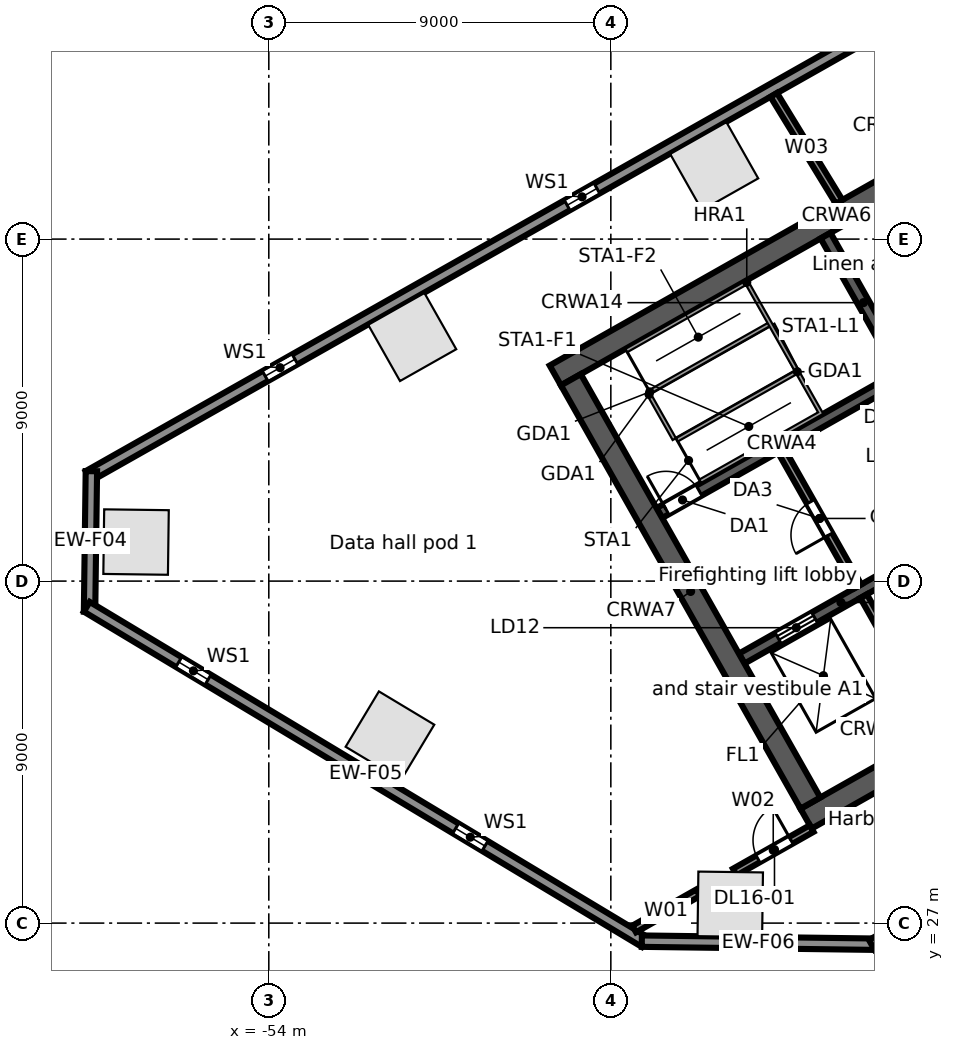
"""IFC4 building model, lengths in metres.
Left out: names, types, materials, properties, quantities, classifications, styles, units other than length and angle.
Written with IfcOpenShell. Run it as: python <this file> out.ifc"""

import sys

from ifc_helpers import new_model, si_unit, direction, frame, frame_2d, origin, origin_2d, place, context, subcontext, project, spatial, rectangle, extrude, element, fill, save


model = new_model("IFC4")
c1 = context("Model", 3, precision=1e-05, world=origin(), true_north=direction((0.0, 1.0)))
c2 = subcontext(c1, "Body", "Model", "MODEL_VIEW")
j1 = project(units=[si_unit("LENGTHUNIT", "METRE"), si_unit("PLANEANGLEUNIT", "RADIAN")], contexts=[c1])
p1 = place(None, origin())
s1 = spatial("IfcSite", under=j1, at=p1, CompositionType="ELEMENT")
p2 = place(p1, origin())
s2 = spatial("IfcBuilding", under=s1, at=p2, CompositionType="ELEMENT")
p3 = place(p2, frame((0.0, 0.0, 81.5)))
s3 = spatial("IfcBuildingStorey", under=s2, at=p3, CompositionType="ELEMENT", Elevation=81.5)
for number, where, z_axis, x_axis in (
    (1, (-42.28, 46.919, 0.0), (0.0, 0.0, 1.0), (-0.87, -0.492, 0.0)),
    (2, (-50.226, 42.423, 0.0), (0.0, 0.0, 1.0), (-0.87, -0.492, 0.0)),
    (3, (-57.493, 37.027, 0.0), (0.0, 0.0, 1.0), (-0.013, -1.0, 0.0)),
    (4, (-50.812, 31.931, 0.0), (0.0, 0.0, 1.0), (0.857, -0.515, 0.0)),
    (5, (-41.858, 27.495, 0.0), (0.0, 0.0, 1.0), (1.0, -0.013, 0.0)),
):
    element("IfcColumn", number, at=place(p3, frame(where, z_axis=z_axis, x_axis=x_axis)), inside=s3, PredefinedType="COLUMN", context=c2, shape_type="SweptSolid", body=[
        extrude(rectangle(XDim=1.7, YDim=1.7, at=origin_2d()), origin(), (0.0, 0.0, 1.0), 5.0),
    ])
p4 = place(p3, frame((-58.745, 38.764, 0.0), z_axis=(0.0, 0.0, 1.0), x_axis=(0.870355811726, 0.492423355453, 0.0)))
e6 = element("IfcWall", 6, at=p4, inside=s3, PredefinedType="STANDARD", context=c2, shape_type="SweptSolid", body=[
    extrude(rectangle(XDim=64.025, YDim=0.3, at=frame_2d((32.013, 0.0))), origin(), (0.0, 0.0, 1.0), 4.68),
])
p5 = place(p4, frame((60.122, 0.0, 0.6)))
e7 = element("IfcOpeningElement", 7, at=p5, cuts=e6, PredefinedType="OPENING", context=c2, shape_type="SweptSolid", body=[
    extrude(rectangle(XDim=0.9, YDim=3.2, at=frame_2d((0.45, 1.6))), frame((0.0, 0.16, 0.0), z_axis=(0.0, -1.0, 0.0), x_axis=(1.0, 0.0, 0.0)), (0.0, 0.0, 1.0), 0.32),
])
p6 = place(p4, frame((50.992, 0.0, 0.6)))
e8 = element("IfcOpeningElement", 8, at=p6, cuts=e6, PredefinedType="OPENING", context=c2, shape_type="SweptSolid", body=[
    extrude(rectangle(XDim=0.9, YDim=3.2, at=frame_2d((0.45, 1.6))), frame((0.0, 0.16, 0.0), z_axis=(0.0, -1.0, 0.0), x_axis=(1.0, 0.0, 0.0)), (0.0, 0.0, 1.0), 0.32),
])
p7 = place(p4, frame((41.862, 0.0, 0.6)))
e9 = element("IfcOpeningElement", 9, at=p7, cuts=e6, PredefinedType="OPENING", context=c2, shape_type="SweptSolid", body=[
    extrude(rectangle(XDim=0.9, YDim=3.2, at=frame_2d((0.45, 1.6))), frame((0.0, 0.16, 0.0), z_axis=(0.0, -1.0, 0.0), x_axis=(1.0, 0.0, 0.0)), (0.0, 0.0, 1.0), 0.32),
])
p8 = place(p4, frame((32.732, 0.0, 0.6)))
e10 = element("IfcOpeningElement", 10, at=p8, cuts=e6, PredefinedType="OPENING", context=c2, shape_type="SweptSolid", body=[
    extrude(rectangle(XDim=0.9, YDim=3.2, at=frame_2d((0.45, 1.6))), frame((0.0, 0.16, 0.0), z_axis=(0.0, -1.0, 0.0), x_axis=(1.0, 0.0, 0.0)), (0.0, 0.0, 1.0), 0.32),
])
p9 = place(p4, frame((23.602, 0.0, 0.6)))
e11 = element("IfcOpeningElement", 11, at=p9, cuts=e6, PredefinedType="OPENING", context=c2, shape_type="SweptSolid", body=[
    extrude(rectangle(XDim=0.9, YDim=3.2, at=frame_2d((0.45, 1.6))), frame((0.0, 0.16, 0.0), z_axis=(0.0, -1.0, 0.0), x_axis=(1.0, 0.0, 0.0)), (0.0, 0.0, 1.0), 0.32),
])
p10 = place(p4, frame((14.472, 0.0, 0.6)))
e12 = element("IfcOpeningElement", 12, at=p10, cuts=e6, PredefinedType="OPENING", context=c2, shape_type="SweptSolid", body=[
    extrude(rectangle(XDim=0.9, YDim=3.2, at=frame_2d((0.45, 1.6))), frame((0.0, 0.16, 0.0), z_axis=(0.0, -1.0, 0.0), x_axis=(1.0, 0.0, 0.0)), (0.0, 0.0, 1.0), 0.32),
])
p11 = place(p4, frame((5.342, 0.0, 0.6)))
e13 = element("IfcOpeningElement", 13, at=p11, cuts=e6, PredefinedType="OPENING", context=c2, shape_type="SweptSolid", body=[
    extrude(rectangle(XDim=0.9, YDim=3.2, at=frame_2d((0.45, 1.6))), frame((0.0, 0.16, 0.0), z_axis=(0.0, -1.0, 0.0), x_axis=(1.0, 0.0, 0.0)), (0.0, 0.0, 1.0), 0.32),
])
p12 = place(p3, frame((-58.717, 35.194, 0.0), z_axis=(0.0, 0.0, 1.0), x_axis=(0.013069053407, 0.999914596275, 0.0)))
e14 = element("IfcWall", 14, at=p12, inside=s3, PredefinedType="STANDARD", context=c2, shape_type="SweptSolid", body=[
    extrude(rectangle(XDim=3.699, YDim=0.3, at=frame_2d((1.849, 0.0))), origin(), (0.0, 0.0, 1.0), 4.68),
])
p13 = place(p3, frame((-44.109, 26.504, 0.0), z_axis=(0.0, 0.0, 1.0), x_axis=(-0.857169502585, 0.515034410344, 0.0)))
e15 = element("IfcWall", 15, at=p13, inside=s3, PredefinedType="STANDARD", context=c2, shape_type="SweptSolid", body=[
    extrude(rectangle(XDim=17.127, YDim=0.3, at=frame_2d((8.563, 0.0))), origin(), (0.0, 0.0, 1.0), 4.68),
])
p14 = place(p13, frame((13.403, 0.0, 0.6)))
e16 = element("IfcOpeningElement", 16, at=p14, cuts=e15, PredefinedType="OPENING", context=c2, shape_type="SweptSolid", body=[
    extrude(rectangle(XDim=0.9, YDim=3.2, at=frame_2d((0.45, 1.6))), frame((0.0, 0.16, 0.0), z_axis=(0.0, -1.0, 0.0), x_axis=(1.0, 0.0, 0.0)), (0.0, 0.0, 1.0), 0.32),
])
p15 = place(p13, frame((4.903, 0.0, 0.6)))
e17 = element("IfcOpeningElement", 17, at=p15, cuts=e15, PredefinedType="OPENING", context=c2, shape_type="SweptSolid", body=[
    extrude(rectangle(XDim=0.9, YDim=3.2, at=frame_2d((0.45, 1.6))), frame((0.0, 0.16, 0.0), z_axis=(0.0, -1.0, 0.0), x_axis=(1.0, 0.0, 0.0)), (0.0, 0.0, 1.0), 0.32),
])
p16 = place(p3, frame((-38.057, 26.445, 0.0), z_axis=(0.0, 0.0, 1.0), x_axis=(-0.999914086342, 0.013108010296, 0.0)))
e18 = element("IfcWall", 18, at=p16, inside=s3, PredefinedType="STANDARD", context=c2, shape_type="SweptSolid", body=[
    extrude(rectangle(XDim=6.128, YDim=0.3, at=frame_2d((3.064, 0.0))), origin(), (0.0, 0.0, 1.0), 4.68),
])
p17 = place(p3, frame((-0.055, 47.969, 0.0), z_axis=(0.0, 0.0, 1.0), x_axis=(-0.870355730478, -0.492423499058, 0.0)))
e19 = element("IfcWall", 19, at=p17, inside=s3, PredefinedType="STANDARD", context=c2, shape_type="SweptSolid", body=[
    extrude(rectangle(XDim=43.75, YDim=0.3, at=frame_2d((21.875, 0.0))), origin(), (0.0, 0.0, 1.0), 4.68),
])
p18 = place(p17, frame((39.977, 0.0, 0.6)))
e20 = element("IfcOpeningElement", 20, at=p18, cuts=e19, PredefinedType="OPENING", context=c2, shape_type="SweptSolid", body=[
    extrude(rectangle(XDim=0.9, YDim=3.2, at=frame_2d((0.45, 1.6))), frame((0.0, 0.16, 0.0), z_axis=(0.0, -1.0, 0.0), x_axis=(1.0, 0.0, 0.0)), (0.0, 0.0, 1.0), 0.32),
])
p19 = place(p17, frame((31.222, 0.0, 0.6)))
e21 = element("IfcOpeningElement", 21, at=p19, cuts=e19, PredefinedType="OPENING", context=c2, shape_type="SweptSolid", body=[
    extrude(rectangle(XDim=0.9, YDim=3.2, at=frame_2d((0.45, 1.6))), frame((0.0, 0.16, 0.0), z_axis=(0.0, -1.0, 0.0), x_axis=(1.0, 0.0, 0.0)), (0.0, 0.0, 1.0), 0.32),
])
p20 = place(p17, frame((22.468, 0.0, 0.6)))
e22 = element("IfcOpeningElement", 22, at=p20, cuts=e19, PredefinedType="OPENING", context=c2, shape_type="SweptSolid", body=[
    extrude(rectangle(XDim=0.9, YDim=3.2, at=frame_2d((0.45, 1.6))), frame((0.0, 0.16, 0.0), z_axis=(0.0, -1.0, 0.0), x_axis=(1.0, 0.0, 0.0)), (0.0, 0.0, 1.0), 0.32),
])
p21 = place(p17, frame((13.713, 0.0, 0.6)))
e23 = element("IfcOpeningElement", 23, at=p21, cuts=e19, PredefinedType="OPENING", context=c2, shape_type="SweptSolid", body=[
    extrude(rectangle(XDim=0.9, YDim=3.2, at=frame_2d((0.45, 1.6))), frame((0.0, 0.16, 0.0), z_axis=(0.0, -1.0, 0.0), x_axis=(1.0, 0.0, 0.0)), (0.0, 0.0, 1.0), 0.32),
])
p22 = place(p17, frame((4.959, 0.0, 0.6)))
e24 = element("IfcOpeningElement", 24, at=p22, cuts=e19, PredefinedType="OPENING", context=c2, shape_type="SweptSolid", body=[
    extrude(rectangle(XDim=0.9, YDim=3.2, at=frame_2d((0.45, 1.6))), frame((0.0, 0.16, 0.0), z_axis=(0.0, -1.0, 0.0), x_axis=(1.0, 0.0, 0.0)), (0.0, 0.0, 1.0), 0.32),
])
p23 = place(p3, frame((-39.862, 29.749, 0.0), z_axis=(0.0, 0.0, 1.0), x_axis=(0.870350116061, 0.492433422375, 0.0)))
e25 = element("IfcWall", 25, at=p23, inside=s3, PredefinedType="SOLIDWALL", context=c2, shape_type="SweptSolid", body=[
    extrude(rectangle(XDim=17.0, YDim=0.6, at=frame_2d((8.5, 0.0))), origin(), (0.0, 0.0, 1.0), 4.68),
])
p24 = place(p23, frame((7.2, 0.0, 0.0)))
e26 = element("IfcOpeningElement", 26, at=p24, cuts=e25, PredefinedType="OPENING", context=c2, shape_type="SweptSolid", body=[
    extrude(rectangle(XDim=1.2, YDim=2.1, at=frame_2d((0.6, 1.05))), frame((0.0, 0.31, 0.0), z_axis=(0.0, -1.0, 0.0), x_axis=(1.0, 0.0, 0.0)), (0.0, 0.0, 1.0), 0.62),
])
p25 = place(p3, frame((-41.556, 33.961, 0.0), z_axis=(0.0, 0.0, 1.0), x_axis=(0.870343731308, 0.492444706919, 0.0)))
e27 = element("IfcWall", 27, at=p25, inside=s3, PredefinedType="SOLIDWALL", context=c2, shape_type="SweptSolid", body=[
    extrude(rectangle(XDim=6.0, YDim=0.3, at=frame_2d((3.0, 0.0))), origin(), (0.0, 0.0, 1.0), 4.68),
])
p26 = place(p25, frame((1.1, 0.0, 0.0)))
e28 = element("IfcOpeningElement", 28, at=p26, cuts=e27, PredefinedType="OPENING", context=c2, shape_type="SweptSolid", body=[
    extrude(rectangle(XDim=1.1, YDim=2.1, at=frame_2d((0.55, 1.05))), frame((0.0, 0.16, 0.0), z_axis=(0.0, -1.0, 0.0), x_axis=(1.0, 0.0, 0.0)), (0.0, 0.0, 1.0), 0.32),
])
p27 = place(p25, frame((4.25, 0.0, 0.0)))
e29 = element("IfcOpeningElement", 29, at=p27, cuts=e27, PredefinedType="OPENING", context=c2, shape_type="SweptSolid", body=[
    extrude(rectangle(XDim=1.1, YDim=2.1, at=frame_2d((0.55, 1.05))), frame((0.0, 0.16, 0.0), z_axis=(0.0, -1.0, 0.0), x_axis=(1.0, 0.0, 0.0)), (0.0, 0.0, 1.0), 0.32),
])
p28 = place(p3, frame((-43.723, 37.791, 0.0), z_axis=(0.0, 0.0, 1.0), x_axis=(0.87035077051, 0.49243226567, 0.0)))
e30 = element("IfcWall", 30, at=p28, inside=s3, PredefinedType="SOLIDWALL", context=c2, shape_type="SweptSolid", body=[
    extrude(rectangle(XDim=7.4, YDim=0.3, at=frame_2d((3.7, 0.0))), origin(), (0.0, 0.0, 1.0), 4.68),
])
p29 = place(p28, frame((0.2, 0.0, 0.0)))
e31 = element("IfcOpeningElement", 31, at=p29, cuts=e30, PredefinedType="OPENING", context=c2, shape_type="SweptSolid", body=[
    extrude(rectangle(XDim=1.0, YDim=2.1, at=frame_2d((0.5, 1.05))), frame((0.0, 0.16, 0.0), z_axis=(0.0, -1.0, 0.0), x_axis=(1.0, 0.0, 0.0)), (0.0, 0.0, 1.0), 0.32),
])
p30 = place(p3, frame((-46.461, 41.412, 0.0), z_axis=(0.0, 0.0, 1.0), x_axis=(0.870350116061, 0.492433422375, 0.0)))
e32 = element("IfcWall", 32, at=p30, inside=s3, PredefinedType="SOLIDWALL", context=c2, shape_type="SweptSolid", body=[
    extrude(rectangle(XDim=17.0, YDim=0.6, at=frame_2d((8.5, 0.0))), origin(), (0.0, 0.0, 1.0), 4.68),
])
p31 = place(p3, frame((-46.052, 41.298, 0.0), z_axis=(0.0, 0.0, 1.0), x_axis=(0.492418598281, -0.870358503186, 0.0)))
e33 = element("IfcWall", 33, at=p31, inside=s3, PredefinedType="SOLIDWALL", context=c2, shape_type="SweptSolid", body=[
    extrude(rectangle(XDim=12.8, YDim=0.6, at=frame_2d((6.4, 0.0))), origin(), (0.0, 0.0, 1.0), 4.68),
])
p32 = place(p3, frame((-38.349, 35.603, 0.0), z_axis=(0.0, 0.0, 1.0), x_axis=(0.49241474071, -0.870360685654, 0.0)))
e34 = element("IfcWall", 34, at=p32, inside=s3, PredefinedType="SOLIDWALL", context=c2, shape_type="SweptSolid", body=[
    extrude(rectangle(XDim=4.05, YDim=0.2, at=frame_2d((2.025, 0.0))), origin(), (0.0, 0.0, 1.0), 4.68),
])
p33 = place(p3, frame((-40.516, 39.433, 0.0), z_axis=(0.0, 0.0, 1.0), x_axis=(0.492453559952, -0.87033872216, 0.0)))
e35 = element("IfcWall", 35, at=p33, inside=s3, PredefinedType="PARTITIONING", context=c2, shape_type="SweptSolid", body=[
    extrude(rectangle(XDim=4.1, YDim=0.2, at=frame_2d((2.05, 0.0))), origin(), (0.0, 0.0, 1.0), 4.68),
])
p34 = place(p33, frame((1.55, 0.0, 0.0)))
e36 = element("IfcOpeningElement", 36, at=p34, cuts=e35, PredefinedType="OPENING", context=c2, shape_type="SweptSolid", body=[
    extrude(rectangle(XDim=1.0, YDim=2.1, at=frame_2d((0.5, 1.05))), frame((0.0, 0.11, 0.0), z_axis=(0.0, -1.0, 0.0), x_axis=(1.0, 0.0, 0.0)), (0.0, 0.0, 1.0), 0.22),
])
p35 = place(p3, frame((-39.35, 45.09, 0.0), z_axis=(0.0, 0.0, 1.0), x_axis=(0.49241474071, -0.870360685654, 0.0)))
e37 = element("IfcWall", 37, at=p35, inside=s3, PredefinedType="SOLIDWALL", context=c2, shape_type="SweptSolid", body=[
    extrude(rectangle(XDim=4.05, YDim=0.3, at=frame_2d((2.025, 0.0))), origin(), (0.0, 0.0, 1.0), 4.68),
])
p36 = place(p3, frame((-44.386, 26.845, 0.0), z_axis=(0.0, 0.0, 1.0), x_axis=(0.870226201187, 0.492652371118, 0.0)))
e38 = element("IfcWall", 38, at=p36, inside=s3, PredefinedType="PARTITIONING", context=c2, shape_type="SweptSolid", body=[
    extrude(rectangle(XDim=1.933, YDim=0.2, at=frame_2d((0.966, 0.0))), origin(), (0.0, 0.0, 1.0), 4.68),
])
p37 = place(p3, frame((-41.738, 28.343, 0.0), z_axis=(0.0, 0.0, 1.0), x_axis=(0.870265350095, 0.492583211676, 0.0)))
e39 = element("IfcWall", 39, at=p37, inside=s3, PredefinedType="PARTITIONING", context=c2, shape_type="SweptSolid", body=[
    extrude(rectangle(XDim=2.324, YDim=0.2, at=frame_2d((1.162, 0.0))), origin(), (0.0, 0.0, 1.0), 4.68),
])
p38 = place(p37, frame((0.7, 0.0, 0.0)))
e40 = element("IfcOpeningElement", 40, at=p38, cuts=e39, PredefinedType="OPENING", context=c2, shape_type="SweptSolid", body=[
    extrude(rectangle(XDim=1.0, YDim=2.1, at=frame_2d((0.5, 1.05))), frame((0.0, 0.11, 0.0), z_axis=(0.0, -1.0, 0.0), x_axis=(1.0, 0.0, 0.0)), (0.0, 0.0, 1.0), 0.22),
])
p39 = place(p3, frame((-40.713, 48.794, 0.0), z_axis=(0.0, 0.0, 1.0), x_axis=(0.52165366254, -0.853157345604, 0.0)))
e41 = element("IfcWall", 41, at=p39, inside=s3, PredefinedType="PARTITIONING", context=c2, shape_type="SweptSolid", body=[
    extrude(rectangle(XDim=3.297, YDim=0.2, at=frame_2d((1.648, 0.0))), origin(), (0.0, 0.0, 1.0), 3.96),
])
p40 = place(p10, origin())
e42 = element("IfcWindow", 42, at=p40, inside=s3, PartitioningType="SINGLE_PANEL", PredefinedType="WINDOW", context=c2, shape_type="SweptSolid", body=[
    extrude(rectangle(XDim=0.9, YDim=3.2, at=frame_2d((0.45, 1.6))), frame((0.0, 0.03, 0.0), z_axis=(0.0, -1.0, 0.0), x_axis=(1.0, 0.0, 0.0)), (0.0, 0.0, 1.0), 0.06),
])
fill(e12, e42)
p41 = place(p11, origin())
e43 = element("IfcWindow", 43, at=p41, inside=s3, PartitioningType="SINGLE_PANEL", PredefinedType="WINDOW", context=c2, shape_type="SweptSolid", body=[
    extrude(rectangle(XDim=0.9, YDim=3.2, at=frame_2d((0.45, 1.6))), frame((0.0, 0.03, 0.0), z_axis=(0.0, -1.0, 0.0), x_axis=(1.0, 0.0, 0.0)), (0.0, 0.0, 1.0), 0.06),
])
fill(e13, e43)
p42 = place(p14, origin())
e44 = element("IfcWindow", 44, at=p42, inside=s3, PartitioningType="SINGLE_PANEL", PredefinedType="WINDOW", context=c2, shape_type="SweptSolid", body=[
    extrude(rectangle(XDim=0.9, YDim=3.2, at=frame_2d((0.45, 1.6))), frame((0.0, 0.03, 0.0), z_axis=(0.0, -1.0, 0.0), x_axis=(1.0, 0.0, 0.0)), (0.0, 0.0, 1.0), 0.06),
])
fill(e16, e44)
p43 = place(p15, origin())
e45 = element("IfcWindow", 45, at=p43, inside=s3, PartitioningType="SINGLE_PANEL", PredefinedType="WINDOW", context=c2, shape_type="SweptSolid", body=[
    extrude(rectangle(XDim=0.9, YDim=3.2, at=frame_2d((0.45, 1.6))), frame((0.0, 0.03, 0.0), z_axis=(0.0, -1.0, 0.0), x_axis=(1.0, 0.0, 0.0)), (0.0, 0.0, 1.0), 0.06),
])
fill(e17, e45)
p44 = place(p26, origin())
e46 = element("IfcDoor", 46, at=p44, inside=s3, OperationType="DOUBLE_DOOR_SLIDING", PredefinedType="DOOR", context=c2, shape_type="SweptSolid", body=[
    extrude(rectangle(XDim=1.1, YDim=2.1, at=frame_2d((0.55, 1.05))), frame((0.0, 0.025, 0.0), z_axis=(0.0, -1.0, 0.0), x_axis=(1.0, 0.0, 0.0)), (0.0, 0.0, 1.0), 0.05),
])
fill(e28, e46)
p45 = place(p29, origin())
e47 = element("IfcDoor", 47, at=p45, inside=s3, OperationType="SINGLE_SWING_LEFT", PredefinedType="DOOR", context=c2, shape_type="SweptSolid", body=[
    extrude(rectangle(XDim=1.0, YDim=2.1, at=frame_2d((0.5, 1.05))), frame((0.0, 0.025, 0.0), z_axis=(0.0, -1.0, 0.0), x_axis=(1.0, 0.0, 0.0)), (0.0, 0.0, 1.0), 0.05),
])
fill(e31, e47)
p46 = place(p34, frame((1.0, 0.0, 0.0), z_axis=(0.0, 0.0, 1.0), x_axis=(-1.0, 0.0, 0.0)))
e48 = element("IfcDoor", 48, at=p46, inside=s3, OperationType="SINGLE_SWING_LEFT", PredefinedType="DOOR", context=c2, shape_type="SweptSolid", body=[
    extrude(rectangle(XDim=1.0, YDim=2.1, at=frame_2d((0.5, 1.05))), frame((0.0, 0.025, 0.0), z_axis=(0.0, -1.0, 0.0), x_axis=(1.0, 0.0, 0.0)), (0.0, 0.0, 1.0), 0.05),
])
fill(e36, e48)
p47 = place(p38, origin())
e49 = element("IfcDoor", 49, at=p47, inside=s3, OperationType="SINGLE_SWING_RIGHT", PredefinedType="DOOR", context=c2, shape_type="SweptSolid", body=[
    extrude(rectangle(XDim=1.0, YDim=2.1, at=frame_2d((0.5, 1.05))), frame((0.0, 0.025, 0.0), z_axis=(0.0, -1.0, 0.0), x_axis=(1.0, 0.0, 0.0)), (0.0, 0.0, 1.0), 0.05),
])
fill(e40, e49)
save(model, sys.argv[1])
